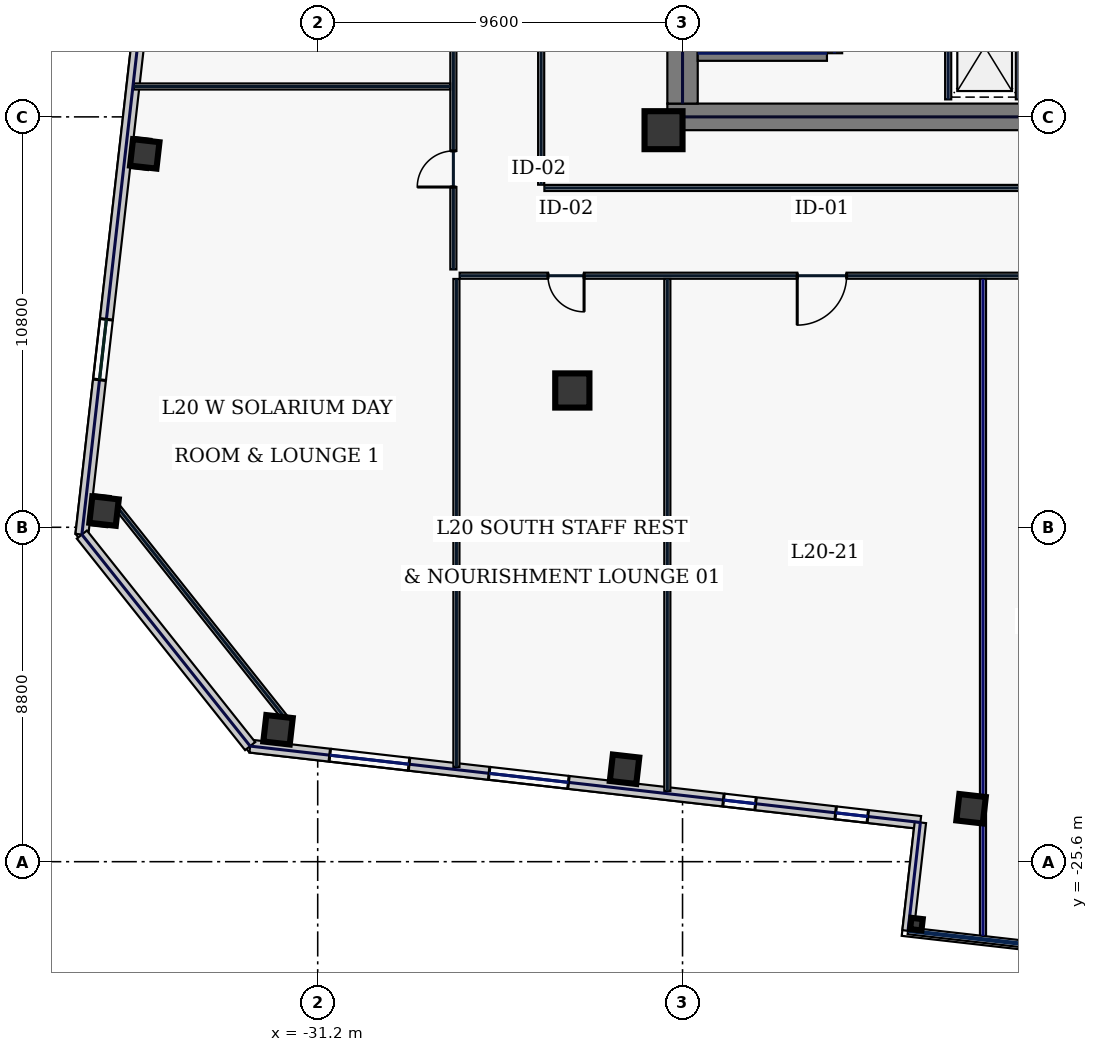
"""IFC4 building model, lengths in metres.
Left out: names, types, materials, properties, quantities, classifications, styles, units other than length and angle.
Written with IfcOpenShell. Run it as: python <this file> out.ifc"""

import sys

from ifc_helpers import new_model, si_unit, direction, frame, frame_2d, origin, origin_2d, place, context, subcontext, project, spatial, rectangle, hollow_rectangle, extrude, element, fill, save


model = new_model("IFC4")
c1 = context("Model", 3, precision=1e-05, world=origin(), true_north=direction((0.0, 1.0)))
c2 = subcontext(c1, "Body", "Model", "MODEL_VIEW")
j1 = project(units=[si_unit("LENGTHUNIT", "METRE"), si_unit("PLANEANGLEUNIT", "RADIAN")], contexts=[c1])
p1 = place(None, origin())
s1 = spatial("IfcSite", under=j1, at=p1, CompositionType="ELEMENT")
p2 = place(p1, origin())
s2 = spatial("IfcBuilding", under=s1, at=p2, CompositionType="ELEMENT")
p3 = place(p2, frame((0.0, 0.0, 93.4)))
s3 = spatial("IfcBuildingStorey", under=s2, at=p3, CompositionType="ELEMENT", Elevation=93.4)
p4 = place(p3, frame((-22.0, -6.0, 0.0), z_axis=(0.0, 0.0, 1.0), x_axis=(1.0, 0.0, 0.0)))
e1 = element("IfcWall", 1, at=p4, inside=s3, PredefinedType="SHEAR", context=c2, shape_type="SweptSolid", body=[
    extrude(rectangle(XDim=11.55, YDim=0.7, at=frame_2d((5.775, 0.0))), origin(), (0.0, 0.0, 1.0), 3.74),
])
p5 = place(p3, frame((-21.6, -5.65, 0.0), z_axis=(0.0, 0.0, 1.0), x_axis=(0.0, 1.0, 0.0)))
e2 = element("IfcWall", 2, at=p5, inside=s3, PredefinedType="SHEAR", context=c2, shape_type="SweptSolid", body=[
    extrude(rectangle(XDim=11.3, YDim=0.8, at=frame_2d((5.65, 0.0))), origin(), (0.0, 0.0, 1.0), 3.74),
])
p6 = place(p3, frame((-17.6, -4.325, 0.0), z_axis=(0.0, 0.0, 1.0), x_axis=(0.0, 1.0, 0.0)))
e3 = element("IfcWall", 3, at=p6, inside=s3, PredefinedType="SHEAR", context=c2, shape_type="SweptSolid", body=[
    extrude(rectangle(XDim=8.65, YDim=0.4, at=frame_2d((4.325, 0.0))), origin(), (0.0, 0.0, 1.0), 3.74),
])
p7 = place(p6, frame((0.25, 0.0, 0.0)))
e4 = element("IfcOpeningElement", 4, at=p7, cuts=e3, PredefinedType="OPENING", context=c2, shape_type="SweptSolid", body=[
    extrude(rectangle(XDim=1.1, YDim=2.2, at=frame_2d((0.55, 1.1))), frame((0.0, 0.21, 0.0), z_axis=(0.0, -1.0, 0.0), x_axis=(1.0, 0.0, 0.0)), (0.0, 0.0, 1.0), 0.42),
])
p8 = place(p3, frame((-21.2, -4.325, 0.0), z_axis=(0.0, 0.0, 1.0), x_axis=(1.0, 0.0, 0.0)))
e5 = element("IfcWall", 5, at=p8, inside=s3, PredefinedType="SHEAR", context=c2, shape_type="SweptSolid", body=[
    extrude(rectangle(XDim=3.4, YDim=0.4, at=frame_2d((1.7, 0.0))), origin(), (0.0, 0.0, 1.0), 3.74),
])
p9 = place(p3, frame((-22.1, -6.35, 0.0), z_axis=(0.0, 0.0, 1.0), x_axis=(1.0, 0.0, 0.0)))
e6 = element("IfcColumn", 6, at=p9, inside=s3, PredefinedType="COLUMN", context=c2, shape_type="SweptSolid", body=[
    extrude(hollow_rectangle(XDim=1.0, YDim=1.0, WallThickness=0.045, at=origin_2d()), origin(), (0.0, 0.0, 1.0), 3.74),
])
p10 = place(p3, frame((-24.5, -13.2, 0.0), z_axis=(0.0, 0.0, 1.0), x_axis=(1.0, 0.0, 0.0)))
e7 = element("IfcColumn", 7, at=p10, inside=s3, PredefinedType="COLUMN", context=c2, shape_type="SweptSolid", body=[
    extrude(hollow_rectangle(XDim=0.9, YDim=0.9, WallThickness=0.04, at=origin_2d()), origin(), (0.0, 0.0, 1.0), 3.74),
])
for number, where, z_axis, x_axis in (
    (8, (-32.244, -22.129, 0.0), (0.0, 0.0, 1.0), (0.994, -0.113, 0.0)),
    (9, (-23.126, -23.168, 0.0), (0.0, 0.0, 1.0), (0.994, -0.113, 0.0)),
    (10, (-14.008, -24.207, 0.0), (0.0, 0.0, 1.0), (0.994, -0.113, 0.0)),
    (11, (-35.751, -6.974, 0.0), (0.0, 0.0, 1.0), (0.994, -0.113, 0.0)),
    (12, (-36.822, -16.374, 0.0), (0.0, 0.0, 1.0), (0.994, -0.113, 0.0)),
):
    element("IfcColumn", number, at=place(p3, frame(where, z_axis=z_axis, x_axis=x_axis)), inside=s3, PredefinedType="COLUMN", context=c2, shape_type="SweptSolid", body=[
        extrude(hollow_rectangle(XDim=0.7, YDim=0.7, WallThickness=0.032, at=origin_2d()), origin(), (0.0, 0.0, 1.0), 3.74),
    ])
p11 = place(p3, frame((-15.445, -27.243, 0.0), z_axis=(0.0, 0.0, 1.0), x_axis=(0.993571855677, -0.113203213768, 0.0)))
e13 = element("IfcColumn", 13, at=p11, inside=s3, PredefinedType="COLUMN", context=c2, shape_type="SweptSolid", body=[
    extrude(hollow_rectangle(XDim=0.3, YDim=0.3, WallThickness=0.016, at=origin_2d()), origin(), (0.0, 0.0, 1.0), 3.74),
])
p12 = place(p3, frame((-32.977, -22.559, 0.0), z_axis=(0.0, 0.0, 1.0), x_axis=(0.993570699365, -0.113213362125, 0.0)))
e14 = element("IfcWall", 14, at=p12, inside=s3, PredefinedType="STANDARD", context=c2, shape_type="SweptSolid", body=[
    extrude(rectangle(XDim=17.75, YDim=0.34, at=frame_2d((8.875, 0.0))), origin(), (0.0, 0.0, 1.0), 3.74),
])
p13 = place(p12, frame((2.108, 0.0, 0.67)))
e15 = element("IfcOpeningElement", 15, at=p13, cuts=e14, PredefinedType="OPENING", context=c2, shape_type="SweptSolid", body=[
    extrude(rectangle(XDim=2.1, YDim=2.2, at=frame_2d((1.05, 1.1))), frame((0.0, 0.18, 0.0), z_axis=(0.0, -1.0, 0.0), x_axis=(1.0, 0.0, 0.0)), (0.0, 0.0, 1.0), 0.36),
])
p14 = place(p12, frame((6.329, 0.0, 0.67)))
e16 = element("IfcOpeningElement", 16, at=p14, cuts=e14, PredefinedType="OPENING", context=c2, shape_type="SweptSolid", body=[
    extrude(rectangle(XDim=2.1, YDim=2.2, at=frame_2d((1.05, 1.1))), frame((0.0, 0.18, 0.0), z_axis=(0.0, -1.0, 0.0), x_axis=(1.0, 0.0, 0.0)), (0.0, 0.0, 1.0), 0.36),
])
p15 = place(p12, frame((12.535, 0.0, 0.67)))
e17 = element("IfcOpeningElement", 17, at=p15, cuts=e14, PredefinedType="OPENING", context=c2, shape_type="SweptSolid", body=[
    extrude(rectangle(XDim=0.85, YDim=1.85, at=frame_2d((0.425, 0.925))), frame((0.0, 0.18, 0.0), z_axis=(0.0, -1.0, 0.0), x_axis=(1.0, 0.0, 0.0)), (0.0, 0.0, 1.0), 0.36),
])
p16 = place(p12, frame((15.506, 0.0, 0.67)))
e18 = element("IfcOpeningElement", 18, at=p16, cuts=e14, PredefinedType="OPENING", context=c2, shape_type="SweptSolid", body=[
    extrude(rectangle(XDim=0.85, YDim=1.85, at=frame_2d((0.425, 0.925))), frame((0.0, 0.18, 0.0), z_axis=(0.0, -1.0, 0.0), x_axis=(1.0, 0.0, 0.0)), (0.0, 0.0, 1.0), 0.36),
])
p17 = place(p3, frame((-32.968, 21.957, 0.0), z_axis=(0.0, 0.0, 1.0), x_axis=(-0.113201605824, -0.993572038877, 0.0)))
e19 = element("IfcWall", 19, at=p17, inside=s3, PredefinedType="STANDARD", context=c2, shape_type="SweptSolid", body=[
    extrude(rectangle(XDim=39.2, YDim=0.34, at=frame_2d((19.6, 0.0))), origin(), (0.0, 0.0, 1.0), 3.74),
])
p18 = place(p17, frame((4.1, 0.0, 0.58)))
e20 = element("IfcOpeningElement", 20, at=p18, cuts=e19, PredefinedType="OPENING", context=c2, shape_type="SweptSolid", body=[
    extrude(rectangle(XDim=1.6, YDim=2.3, at=frame_2d((0.8, 1.15))), frame((0.0, 0.18, 0.0), z_axis=(0.0, -1.0, 0.0), x_axis=(1.0, 0.0, 0.0)), (0.0, 0.0, 1.0), 0.36),
])
p19 = place(p17, frame((13.9, 0.0, 0.58)))
e21 = element("IfcOpeningElement", 21, at=p19, cuts=e19, PredefinedType="OPENING", context=c2, shape_type="SweptSolid", body=[
    extrude(rectangle(XDim=1.6, YDim=2.3, at=frame_2d((0.8, 1.15))), frame((0.0, 0.18, 0.0), z_axis=(0.0, -1.0, 0.0), x_axis=(1.0, 0.0, 0.0)), (0.0, 0.0, 1.0), 0.36),
])
p20 = place(p17, frame((23.7, 0.0, 0.58)))
e22 = element("IfcOpeningElement", 22, at=p20, cuts=e19, PredefinedType="OPENING", context=c2, shape_type="SweptSolid", body=[
    extrude(rectangle(XDim=1.6, YDim=2.3, at=frame_2d((0.8, 1.15))), frame((0.0, 0.18, 0.0), z_axis=(0.0, -1.0, 0.0), x_axis=(1.0, 0.0, 0.0)), (0.0, 0.0, 1.0), 0.36),
])
p21 = place(p17, frame((33.5, 0.0, 0.58)))
e23 = element("IfcOpeningElement", 23, at=p21, cuts=e19, PredefinedType="OPENING", context=c2, shape_type="SweptSolid", body=[
    extrude(rectangle(XDim=1.6, YDim=2.3, at=frame_2d((0.8, 1.15))), frame((0.0, 0.18, 0.0), z_axis=(0.0, -1.0, 0.0), x_axis=(1.0, 0.0, 0.0)), (0.0, 0.0, 1.0), 0.36),
])
p22 = place(p3, frame((-37.406, -16.991, 0.0), z_axis=(0.0, 0.0, 1.0), x_axis=(0.622507800567, -0.78261359446, 0.0)))
e24 = element("IfcWall", 24, at=p22, inside=s3, PredefinedType="STANDARD", context=c2, shape_type="SweptSolid", body=[
    extrude(rectangle(XDim=7.114, YDim=0.34, at=frame_2d((3.557, 0.0))), origin(), (0.0, 0.0, 1.0), 3.74),
])
p23 = place(p3, frame((-15.342, -24.568, 0.0), z_axis=(0.0, 0.0, 1.0), x_axis=(-0.113138727493, -0.99357920084, 0.0)))
e25 = element("IfcWall", 25, at=p23, inside=s3, PredefinedType="STANDARD", context=c2, shape_type="SweptSolid", body=[
    extrude(rectangle(XDim=2.87, YDim=0.3, at=frame_2d((1.435, 0.0))), origin(), (0.0, 0.0, 1.0), 1.535),
])
for number, where, z_axis, x_axis in (
    (26, (-12.75, -5.54, 0.0), (0.0, 0.0, 1.0), (0.0, 1.0, 0.0)),
    (27, (-14.61, -5.54, 0.0), (0.0, 0.0, 1.0), (0.0, 1.0, 0.0)),
):
    element("IfcWall", number, at=place(p3, frame(where, z_axis=z_axis, x_axis=x_axis)), inside=s3, PredefinedType="PARTITIONING", context=c2, shape_type="SweptSolid", body=[
        extrude(rectangle(XDim=2.7, YDim=0.16, at=frame_2d((1.35, 0.0))), origin(), (0.0, 0.0, 1.0), 3.74),
    ])
p24 = place(p3, frame((-36.556, -16.162, 0.0), z_axis=(0.0, 0.0, 1.0), x_axis=(0.622522641622, -0.782601789334, 0.0)))
e28 = element("IfcWall", 28, at=p24, inside=s3, PredefinedType="PARTITIONING", context=c2, shape_type="SweptSolid", body=[
    extrude(rectangle(XDim=7.354, YDim=0.16, at=frame_2d((3.677, 0.0))), origin(), (0.0, 0.0, 1.0), 3.74),
])
p25 = place(p3, frame((-27.63, -10.015, 0.0), z_axis=(0.0, 0.0, 1.0), x_axis=(0.0, 1.0, 0.0)))
e29 = element("IfcWall", 29, at=p25, inside=s3, PredefinedType="PARTITIONING", context=c2, shape_type="SweptSolid", body=[
    extrude(rectangle(XDim=20.13, YDim=0.16, at=frame_2d((10.065, 0.0))), origin(), (0.0, 0.0, 1.0), 3.74),
])
p26 = place(p25, frame((2.169, 0.0, 0.0)))
e30 = element("IfcOpeningElement", 30, at=p26, cuts=e29, PredefinedType="OPENING", context=c2, shape_type="SweptSolid", body=[
    extrude(rectangle(XDim=0.95, YDim=2.2, at=frame_2d((0.475, 1.1))), frame((0.0, 0.09, 0.0), z_axis=(0.0, -1.0, 0.0), x_axis=(1.0, 0.0, 0.0)), (0.0, 0.0, 1.0), 0.18),
])
p27 = place(p25, frame((7.025, 0.0, 0.0)))
e31 = element("IfcOpeningElement", 31, at=p27, cuts=e29, PredefinedType="OPENING", context=c2, shape_type="SweptSolid", body=[
    extrude(rectangle(XDim=0.95, YDim=2.2, at=frame_2d((0.475, 1.1))), frame((0.0, 0.09, 0.0), z_axis=(0.0, -1.0, 0.0), x_axis=(1.0, 0.0, 0.0)), (0.0, 0.0, 1.0), 0.18),
])
p28 = place(p25, frame((12.225, 0.0, 0.0)))
e32 = element("IfcOpeningElement", 32, at=p28, cuts=e29, PredefinedType="OPENING", context=c2, shape_type="SweptSolid", body=[
    extrude(rectangle(XDim=0.95, YDim=2.2, at=frame_2d((0.475, 1.1))), frame((0.0, 0.09, 0.0), z_axis=(0.0, -1.0, 0.0), x_axis=(1.0, 0.0, 0.0)), (0.0, 0.0, 1.0), 0.18),
])
p29 = place(p25, frame((17.131, 0.0, 0.0)))
e33 = element("IfcOpeningElement", 33, at=p29, cuts=e29, PredefinedType="OPENING", context=c2, shape_type="SweptSolid", body=[
    extrude(rectangle(XDim=0.95, YDim=2.2, at=frame_2d((0.475, 1.1))), frame((0.0, 0.09, 0.0), z_axis=(0.0, -1.0, 0.0), x_axis=(1.0, 0.0, 0.0)), (0.0, 0.0, 1.0), 0.18),
])
p30 = place(p3, frame((27.465, -10.18, 0.0), z_axis=(0.0, 0.0, 1.0), x_axis=(-1.0, 0.0, 0.0)))
e34 = element("IfcWall", 34, at=p30, inside=s3, PredefinedType="PARTITIONING", context=c2, shape_type="SweptSolid", body=[
    extrude(rectangle(XDim=54.93, YDim=0.16, at=frame_2d((27.465, 0.0))), origin(), (0.0, 0.0, 1.0), 3.74),
])
p31 = place(p30, frame((51.656, 0.0, 0.0)))
e35 = element("IfcOpeningElement", 35, at=p31, cuts=e34, PredefinedType="OPENING", context=c2, shape_type="SweptSolid", body=[
    extrude(rectangle(XDim=0.95, YDim=2.2, at=frame_2d((0.475, 1.1))), frame((0.0, 0.09, 0.0), z_axis=(0.0, -1.0, 0.0), x_axis=(1.0, 0.0, 0.0)), (0.0, 0.0, 1.0), 0.18),
])
p32 = place(p30, frame((44.747, 0.0, 0.0)))
e36 = element("IfcOpeningElement", 36, at=p32, cuts=e34, PredefinedType="OPENING", context=c2, shape_type="SweptSolid", body=[
    extrude(rectangle(XDim=1.3, YDim=2.2, at=frame_2d((0.65, 1.1))), frame((0.0, 0.09, 0.0), z_axis=(0.0, -1.0, 0.0), x_axis=(1.0, 0.0, 0.0)), (0.0, 0.0, 1.0), 0.18),
])
p33 = place(p30, frame((35.091, 0.0, 0.0)))
e37 = element("IfcOpeningElement", 37, at=p33, cuts=e34, PredefinedType="OPENING", context=c2, shape_type="SweptSolid", body=[
    extrude(rectangle(XDim=1.3, YDim=2.2, at=frame_2d((0.65, 1.1))), frame((0.0, 0.09, 0.0), z_axis=(0.0, -1.0, 0.0), x_axis=(1.0, 0.0, 0.0)), (0.0, 0.0, 1.0), 0.18),
])
p34 = place(p30, frame((29.54, 0.0, 0.0)))
e38 = element("IfcOpeningElement", 38, at=p34, cuts=e34, PredefinedType="OPENING", context=c2, shape_type="SweptSolid", body=[
    extrude(rectangle(XDim=1.45, YDim=2.2, at=frame_2d((0.725, 1.1))), frame((0.0, 0.09, 0.0), z_axis=(0.0, -1.0, 0.0), x_axis=(1.0, 0.0, 0.0)), (0.0, 0.0, 1.0), 0.18),
])
p35 = place(p30, frame((22.872, 0.0, 0.0)))
e39 = element("IfcOpeningElement", 39, at=p35, cuts=e34, PredefinedType="OPENING", context=c2, shape_type="SweptSolid", body=[
    extrude(rectangle(XDim=0.95, YDim=2.2, at=frame_2d((0.475, 1.1))), frame((0.0, 0.09, 0.0), z_axis=(0.0, -1.0, 0.0), x_axis=(1.0, 0.0, 0.0)), (0.0, 0.0, 1.0), 0.18),
])
p36 = place(p30, frame((15.78, 0.0, 0.0)))
e40 = element("IfcOpeningElement", 40, at=p36, cuts=e34, PredefinedType="OPENING", context=c2, shape_type="SweptSolid", body=[
    extrude(rectangle(XDim=0.95, YDim=2.2, at=frame_2d((0.475, 1.1))), frame((0.0, 0.09, 0.0), z_axis=(0.0, -1.0, 0.0), x_axis=(1.0, 0.0, 0.0)), (0.0, 0.0, 1.0), 0.18),
])
p37 = place(p30, frame((9.03, 0.0, 0.0)))
e41 = element("IfcOpeningElement", 41, at=p37, cuts=e34, PredefinedType="OPENING", context=c2, shape_type="SweptSolid", body=[
    extrude(rectangle(XDim=1.05, YDim=2.2, at=frame_2d((0.525, 1.1))), frame((0.0, 0.09, 0.0), z_axis=(0.0, -1.0, 0.0), x_axis=(1.0, 0.0, 0.0)), (0.0, 0.0, 1.0), 0.18),
])
p38 = place(p30, frame((3.044, 0.0, 0.0)))
e42 = element("IfcOpeningElement", 42, at=p38, cuts=e34, PredefinedType="OPENING", context=c2, shape_type="SweptSolid", body=[
    extrude(rectangle(XDim=0.95, YDim=2.2, at=frame_2d((0.475, 1.1))), frame((0.0, 0.09, 0.0), z_axis=(0.0, -1.0, 0.0), x_axis=(1.0, 0.0, 0.0)), (0.0, 0.0, 1.0), 0.18),
])
p39 = place(p3, frame((-25.32, 7.885, 0.0), z_axis=(0.0, 0.0, 1.0), x_axis=(0.0, -1.0, 0.0)))
e43 = element("IfcWall", 43, at=p39, inside=s3, PredefinedType="PARTITIONING", context=c2, shape_type="SweptSolid", body=[
    extrude(rectangle(XDim=15.67, YDim=0.16, at=frame_2d((7.835, 0.0))), origin(), (0.0, 0.0, 1.0), 3.74),
])
p40 = place(p3, frame((-25.235, -7.87, 0.0), z_axis=(0.0, 0.0, 1.0), x_axis=(1.0, 0.0, 0.0)))
e44 = element("IfcWall", 44, at=p40, inside=s3, PredefinedType="PARTITIONING", context=c2, shape_type="SweptSolid", body=[
    extrude(rectangle(XDim=14.57, YDim=0.16, at=frame_2d((7.285, 0.0))), origin(), (0.0, 0.0, 1.0), 3.74),
])
p41 = place(p3, frame((-27.55, -23.106, 0.0), z_axis=(0.0, 0.0, 1.0), x_axis=(0.0, 1.0, 0.0)))
e45 = element("IfcWall", 45, at=p41, inside=s3, PredefinedType="PARTITIONING", context=c2, shape_type="SweptSolid", body=[
    extrude(rectangle(XDim=12.842, YDim=0.16, at=frame_2d((6.421, 0.0))), origin(), (0.0, 0.0, 1.0), 3.74),
])
p42 = place(p3, frame((-22.0, -23.739, 0.0), z_axis=(0.0, 0.0, 1.0), x_axis=(0.0, 1.0, 0.0)))
e46 = element("IfcWall", 46, at=p42, inside=s3, PredefinedType="PARTITIONING", context=c2, shape_type="SweptSolid", body=[
    extrude(rectangle(XDim=13.474, YDim=0.16, at=frame_2d((6.737, 0.0))), origin(), (0.0, 0.0, 1.0), 3.74),
])
p43 = place(p3, frame((-13.694, -27.554, 0.0), z_axis=(0.0, 0.0, 1.0), x_axis=(0.0, 1.0, 0.0)))
e47 = element("IfcWall", 47, at=p43, inside=s3, PredefinedType="PARTITIONING", context=c2, shape_type="SweptSolid", body=[
    extrude(rectangle(XDim=17.289, YDim=0.16, at=frame_2d((8.645, 0.0))), origin(), (0.0, 0.0, 1.0), 1.535),
])
p44 = place(p3, frame((-36.042, -5.2, 0.0), z_axis=(0.0, 0.0, 1.0), x_axis=(1.0, 0.0, 0.0)))
e48 = element("IfcWall", 48, at=p44, inside=s3, PredefinedType="PARTITIONING", context=c2, shape_type="SweptSolid", body=[
    extrude(rectangle(XDim=8.327, YDim=0.16, at=frame_2d((4.164, 0.0))), origin(), (0.0, 0.0, 1.0), 3.74),
])
p45 = place(p13, origin())
e49 = element("IfcWindow", 49, at=p45, inside=s3, PartitioningType="SINGLE_PANEL", PredefinedType="WINDOW", context=c2, shape_type="SweptSolid", body=[
    extrude(rectangle(XDim=2.1, YDim=2.2, at=frame_2d((1.05, 1.1))), frame((0.0, 0.03, 0.0), z_axis=(0.0, -1.0, 0.0), x_axis=(1.0, 0.0, 0.0)), (0.0, 0.0, 1.0), 0.06),
])
fill(e15, e49)
p46 = place(p14, origin())
e50 = element("IfcWindow", 50, at=p46, inside=s3, PartitioningType="SINGLE_PANEL", PredefinedType="WINDOW", context=c2, shape_type="SweptSolid", body=[
    extrude(rectangle(XDim=2.1, YDim=2.2, at=frame_2d((1.05, 1.1))), frame((0.0, 0.03, 0.0), z_axis=(0.0, -1.0, 0.0), x_axis=(1.0, 0.0, 0.0)), (0.0, 0.0, 1.0), 0.06),
])
fill(e16, e50)
p47 = place(p15, origin())
e51 = element("IfcWindow", 51, at=p47, inside=s3, PartitioningType="SINGLE_PANEL", PredefinedType="WINDOW", context=c2, shape_type="SweptSolid", body=[
    extrude(rectangle(XDim=0.85, YDim=1.85, at=frame_2d((0.425, 0.925))), frame((0.0, 0.03, 0.0), z_axis=(0.0, -1.0, 0.0), x_axis=(1.0, 0.0, 0.0)), (0.0, 0.0, 1.0), 0.06),
])
fill(e17, e51)
p48 = place(p16, origin())
e52 = element("IfcWindow", 52, at=p48, inside=s3, PartitioningType="SINGLE_PANEL", PredefinedType="WINDOW", context=c2, shape_type="SweptSolid", body=[
    extrude(rectangle(XDim=0.85, YDim=1.85, at=frame_2d((0.425, 0.925))), frame((0.0, 0.03, 0.0), z_axis=(0.0, -1.0, 0.0), x_axis=(1.0, 0.0, 0.0)), (0.0, 0.0, 1.0), 0.06),
])
fill(e18, e52)
p49 = place(p21, origin())
e53 = element("IfcWindow", 53, at=p49, inside=s3, PartitioningType="SINGLE_PANEL", PredefinedType="WINDOW", context=c2, shape_type="SweptSolid", body=[
    extrude(rectangle(XDim=1.6, YDim=2.3, at=frame_2d((0.8, 1.15))), frame((0.0, 0.03, 0.0), z_axis=(0.0, -1.0, 0.0), x_axis=(1.0, 0.0, 0.0)), (0.0, 0.0, 1.0), 0.06),
])
fill(e23, e53)
p50 = place(p31, origin())
e54 = element("IfcDoor", 54, at=p50, inside=s3, OperationType="SINGLE_SWING_LEFT", PredefinedType="DOOR", context=c2, shape_type="SweptSolid", body=[
    extrude(rectangle(XDim=0.95, YDim=2.2, at=frame_2d((0.475, 1.1))), frame((0.0, 0.025, 0.0), z_axis=(0.0, -1.0, 0.0), x_axis=(1.0, 0.0, 0.0)), (0.0, 0.0, 1.0), 0.05),
])
fill(e35, e54)
p51 = place(p32, origin())
e55 = element("IfcDoor", 55, at=p51, inside=s3, OperationType="SINGLE_SWING_RIGHT", PredefinedType="DOOR", context=c2, shape_type="SweptSolid", body=[
    extrude(rectangle(XDim=1.3, YDim=2.2, at=frame_2d((0.65, 1.1))), frame((0.0, 0.025, 0.0), z_axis=(0.0, -1.0, 0.0), x_axis=(1.0, 0.0, 0.0)), (0.0, 0.0, 1.0), 0.05),
])
fill(e36, e55)
p52 = place(p26, origin())
e56 = element("IfcDoor", 56, at=p52, inside=s3, OperationType="SINGLE_SWING_LEFT", PredefinedType="DOOR", context=c2, shape_type="SweptSolid", body=[
    extrude(rectangle(XDim=0.95, YDim=2.2, at=frame_2d((0.475, 1.1))), frame((0.0, 0.025, 0.0), z_axis=(0.0, -1.0, 0.0), x_axis=(1.0, 0.0, 0.0)), (0.0, 0.0, 1.0), 0.05),
])
fill(e30, e56)
save(model, sys.argv[1])
